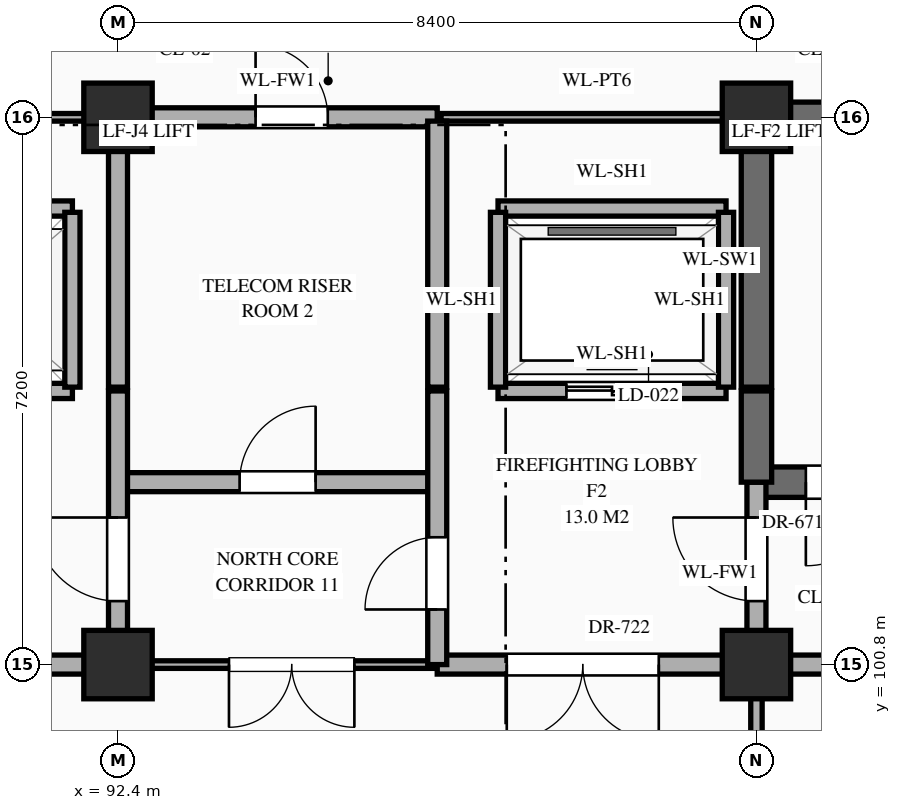
"""IFC4 building model, lengths in metres.
Left out: names, types, materials, properties, quantities, classifications, styles, units other than length and angle.
Written with IfcOpenShell. Run it as: python <this file> out.ifc"""

import sys

from ifc_helpers import new_model, si_unit, direction, frame, frame_2d, origin, origin_2d, place, context, subcontext, project, spatial, rectangle, extrude, element, fill, save


model = new_model("IFC4")
c1 = context("Model", 3, precision=1e-05, world=origin(), true_north=direction((0.0, 1.0)))
c2 = subcontext(c1, "Body", "Model", "MODEL_VIEW")
j1 = project(units=[si_unit("LENGTHUNIT", "METRE"), si_unit("PLANEANGLEUNIT", "RADIAN")], contexts=[c1])
p1 = place(None, origin())
s1 = spatial("IfcSite", under=j1, at=p1, CompositionType="ELEMENT")
p2 = place(p1, origin())
s2 = spatial("IfcBuilding", under=s1, at=p2, CompositionType="ELEMENT")
p3 = place(p2, origin())
s3 = spatial("IfcBuildingStorey", under=s2, at=p3, CompositionType="ELEMENT", Elevation=0.0)
for number, where, z_axis, x_axis in (
    (1, (92.4, 100.8, 0.0), (0.0, 0.0, 1.0), (1.0, 0.0, 0.0)),
    (2, (92.4, 108.0, 0.0), (0.0, 0.0, 1.0), (1.0, 0.0, 0.0)),
    (3, (100.8, 100.8, 0.0), (0.0, 0.0, 1.0), (1.0, 0.0, 0.0)),
    (4, (100.8, 108.0, 0.0), (0.0, 0.0, 1.0), (1.0, 0.0, 0.0)),
):
    element("IfcColumn", number, at=place(p3, frame(where, z_axis=z_axis, x_axis=x_axis)), inside=s3, PredefinedType="COLUMN", context=c2, shape_type="SweptSolid", body=[
        extrude(rectangle(XDim=0.9, YDim=0.9, at=origin_2d()), origin(), (0.0, 0.0, 1.0), 5.4),
    ])
p4 = place(p3, frame((75.6, 100.8, 0.0), z_axis=(0.0, 0.0, 1.0), x_axis=(1.0, 0.0, 0.0)))
e5 = element("IfcWall", 5, at=p4, inside=s3, PredefinedType="STANDARD", context=c2, shape_type="SweptSolid", body=[
    extrude(rectangle(XDim=16.8, YDim=0.25, at=frame_2d((8.4, 0.0))), origin(), (0.0, 0.0, 1.0), 4.27),
])
p5 = place(p4, frame((3.2, 0.0, 0.0)))
e6 = element("IfcOpeningElement", 6, at=p5, cuts=e5, PredefinedType="OPENING", context=c2, shape_type="SweptSolid", body=[
    extrude(rectangle(XDim=2.0, YDim=2.4, at=frame_2d((1.0, 1.2))), frame((0.0, 0.137, 0.0), z_axis=(0.0, -1.0, 0.0), x_axis=(1.0, 0.0, 0.0)), (0.0, 0.0, 1.0), 0.274),
])
p6 = place(p4, frame((11.7, 0.0, 0.0)))
e7 = element("IfcOpeningElement", 7, at=p6, cuts=e5, PredefinedType="OPENING", context=c2, shape_type="SweptSolid", body=[
    extrude(rectangle(XDim=1.8, YDim=2.35, at=frame_2d((0.9, 1.175))), frame((0.0, 0.137, 0.0), z_axis=(0.0, -1.0, 0.0), x_axis=(1.0, 0.0, 0.0)), (0.0, 0.0, 1.0), 0.274),
])
p7 = place(p3, frame((92.4, 100.8, 0.0), z_axis=(0.0, 0.0, 1.0), x_axis=(1.0, 0.0, 0.0)))
e8 = element("IfcWall", 8, at=p7, inside=s3, PredefinedType="STANDARD", context=c2, shape_type="SweptSolid", body=[
    extrude(rectangle(XDim=4.2, YDim=0.1, at=frame_2d((2.1, 0.0))), origin(), (0.0, 0.0, 1.0), 4.27),
])
p8 = place(p7, frame((1.46, 0.0, 0.0)))
e9 = element("IfcOpeningElement", 9, at=p8, cuts=e8, PredefinedType="OPENING", context=c2, shape_type="SweptSolid", body=[
    extrude(rectangle(XDim=1.65, YDim=2.4, at=frame_2d((0.825, 1.2))), frame((0.0, 0.062, 0.0), z_axis=(0.0, -1.0, 0.0), x_axis=(1.0, 0.0, 0.0)), (0.0, 0.0, 1.0), 0.124),
])
p9 = place(p3, frame((96.6, 100.8, 0.0), z_axis=(0.0, 0.0, 1.0), x_axis=(1.0, 0.0, 0.0)))
e10 = element("IfcWall", 10, at=p9, inside=s3, PredefinedType="STANDARD", context=c2, shape_type="SweptSolid", body=[
    extrude(rectangle(XDim=16.0, YDim=0.25, at=frame_2d((8.0, 0.0))), origin(), (0.0, 0.0, 1.0), 4.27),
])
p10 = place(p9, frame((7.925, 0.0, 0.0)))
e11 = element("IfcOpeningElement", 11, at=p10, cuts=e10, PredefinedType="OPENING", context=c2, shape_type="SweptSolid", body=[
    extrude(rectangle(XDim=0.95, YDim=2.15, at=frame_2d((0.475, 1.075))), frame((0.0, 0.137, 0.0), z_axis=(0.0, -1.0, 0.0), x_axis=(1.0, 0.0, 0.0)), (0.0, 0.0, 1.0), 0.274),
])
p11 = place(p9, frame((0.915, 0.0, 0.0)))
e12 = element("IfcOpeningElement", 12, at=p11, cuts=e10, PredefinedType="OPENING", context=c2, shape_type="SweptSolid", body=[
    extrude(rectangle(XDim=2.0, YDim=2.4, at=frame_2d((1.0, 1.2))), frame((0.0, 0.137, 0.0), z_axis=(0.0, -1.0, 0.0), x_axis=(1.0, 0.0, 0.0)), (0.0, 0.0, 1.0), 0.274),
])
p12 = place(p3, frame((92.4, 103.2, 0.0), z_axis=(0.0, 0.0, 1.0), x_axis=(1.0, 0.0, 0.0)))
e13 = element("IfcWall", 13, at=p12, inside=s3, PredefinedType="STANDARD", context=c2, shape_type="SweptSolid", body=[
    extrude(rectangle(XDim=4.2, YDim=0.25, at=frame_2d((2.1, 0.0))), origin(), (0.0, 0.0, 1.0), 5.12),
])
p13 = place(p12, frame((1.6, 0.0, 0.0)))
e14 = element("IfcOpeningElement", 14, at=p13, cuts=e13, PredefinedType="OPENING", context=c2, shape_type="SweptSolid", body=[
    extrude(rectangle(XDim=1.0, YDim=2.2, at=frame_2d((0.5, 1.1))), frame((0.0, 0.137, 0.0), z_axis=(0.0, -1.0, 0.0), x_axis=(1.0, 0.0, 0.0)), (0.0, 0.0, 1.0), 0.274),
])
p14 = place(p3, frame((100.8, 103.2, 0.0), z_axis=(0.0, 0.0, 1.0), x_axis=(1.0, 0.0, 0.0)))
e15 = element("IfcWall", 15, at=p14, inside=s3, PredefinedType="SHEAR", context=c2, shape_type="SweptSolid", body=[
    extrude(rectangle(XDim=8.4, YDim=0.4, at=frame_2d((4.2, 0.0))), origin(), (0.0, 0.0, 1.0), 5.12),
])
p15 = place(p14, frame((0.65, 0.0, 0.0)))
e16 = element("IfcOpeningElement", 16, at=p15, cuts=e15, PredefinedType="OPENING", context=c2, shape_type="SweptSolid", body=[
    extrude(rectangle(XDim=1.1, YDim=2.2, at=frame_2d((0.55, 1.1))), frame((0.0, 0.212, 0.0), z_axis=(0.0, -1.0, 0.0), x_axis=(1.0, 0.0, 0.0)), (0.0, 0.0, 1.0), 0.424),
])
p16 = place(p3, frame((89.4, 104.4, 0.0), z_axis=(0.0, 0.0, 1.0), x_axis=(1.0, 0.0, 0.0)))
e17 = element("IfcWall", 17, at=p16, inside=s3, PredefinedType="STANDARD", context=c2, shape_type="SweptSolid", body=[
    extrude(rectangle(XDim=2.4, YDim=0.2, at=frame_2d((1.2, 0.0))), origin(), (0.0, 0.0, 1.0), 5.12),
])
p17 = place(p16, frame((0.7, 0.0, 0.0)))
e18 = element("IfcOpeningElement", 18, at=p17, cuts=e17, PredefinedType="OPENING", context=c2, shape_type="SweptSolid", body=[
    extrude(rectangle(XDim=1.0, YDim=2.15, at=frame_2d((0.5, 1.075))), frame((0.0, 0.112, 0.0), z_axis=(0.0, -1.0, 0.0), x_axis=(1.0, 0.0, 0.0)), (0.0, 0.0, 1.0), 0.224),
])
p18 = place(p3, frame((97.4, 104.4, 0.0), z_axis=(0.0, 0.0, 1.0), x_axis=(1.0, 0.0, 0.0)))
e19 = element("IfcWall", 19, at=p18, inside=s3, PredefinedType="STANDARD", context=c2, shape_type="SweptSolid", body=[
    extrude(rectangle(XDim=3.0, YDim=0.2, at=frame_2d((1.5, 0.0))), origin(), (0.0, 0.0, 1.0), 5.12),
])
p19 = place(p18, frame((0.9, 0.0, 0.0)))
e20 = element("IfcOpeningElement", 20, at=p19, cuts=e19, PredefinedType="OPENING", context=c2, shape_type="SweptSolid", body=[
    extrude(rectangle(XDim=1.2, YDim=2.15, at=frame_2d((0.6, 1.075))), frame((0.0, 0.112, 0.0), z_axis=(0.0, -1.0, 0.0), x_axis=(1.0, 0.0, 0.0)), (0.0, 0.0, 1.0), 0.224),
])
p20 = place(p3, frame((89.4, 106.8, 0.0), z_axis=(0.0, 0.0, 1.0), x_axis=(1.0, 0.0, 0.0)))
e21 = element("IfcWall", 21, at=p20, inside=s3, PredefinedType="STANDARD", context=c2, shape_type="SweptSolid", body=[
    extrude(rectangle(XDim=2.4, YDim=0.2, at=frame_2d((1.2, 0.0))), origin(), (0.0, 0.0, 1.0), 5.12),
])
p21 = place(p3, frame((97.4, 106.8, 0.0), z_axis=(0.0, 0.0, 1.0), x_axis=(1.0, 0.0, 0.0)))
e22 = element("IfcWall", 22, at=p21, inside=s3, PredefinedType="STANDARD", context=c2, shape_type="SweptSolid", body=[
    extrude(rectangle(XDim=3.0, YDim=0.2, at=frame_2d((1.5, 0.0))), origin(), (0.0, 0.0, 1.0), 5.12),
])
p22 = place(p3, frame((86.2, 108.0, 0.0), z_axis=(0.0, 0.0, 1.0), x_axis=(1.0, 0.0, 0.0)))
e23 = element("IfcWall", 23, at=p22, inside=s3, PredefinedType="STANDARD", context=c2, shape_type="SweptSolid", body=[
    extrude(rectangle(XDim=6.15, YDim=0.1, at=frame_2d((3.075, 0.0))), origin(), (0.0, 0.0, 1.0), 4.27),
])
p23 = place(p3, frame((92.4, 108.0, 0.0), z_axis=(0.0, 0.0, 1.0), x_axis=(1.0, 0.0, 0.0)))
e24 = element("IfcWall", 24, at=p23, inside=s3, PredefinedType="STANDARD", context=c2, shape_type="SweptSolid", body=[
    extrude(rectangle(XDim=4.2, YDim=0.25, at=frame_2d((2.1, 0.0))), origin(), (0.0, 0.0, 1.0), 4.27),
])
p24 = place(p23, frame((1.81, 0.0, 0.0)))
e25 = element("IfcOpeningElement", 25, at=p24, cuts=e24, PredefinedType="OPENING", context=c2, shape_type="SweptSolid", body=[
    extrude(rectangle(XDim=0.95, YDim=2.15, at=frame_2d((0.475, 1.075))), frame((0.0, 0.137, 0.0), z_axis=(0.0, -1.0, 0.0), x_axis=(1.0, 0.0, 0.0)), (0.0, 0.0, 1.0), 0.274),
])
p25 = place(p3, frame((96.65, 108.0, 0.0), z_axis=(0.0, 0.0, 1.0), x_axis=(1.0, 0.0, 0.0)))
e26 = element("IfcWall", 26, at=p25, inside=s3, PredefinedType="STANDARD", context=c2, shape_type="SweptSolid", body=[
    extrude(rectangle(XDim=4.1, YDim=0.1, at=frame_2d((2.05, 0.0))), origin(), (0.0, 0.0, 1.0), 4.27),
])
p26 = place(p3, frame((100.8, 108.0, 0.0), z_axis=(0.0, 0.0, 1.0), x_axis=(1.0, 0.0, 0.0)))
e27 = element("IfcWall", 27, at=p26, inside=s3, PredefinedType="SHEAR", context=c2, shape_type="SweptSolid", body=[
    extrude(rectangle(XDim=8.4, YDim=0.4, at=frame_2d((4.2, 0.0))), origin(), (0.0, 0.0, 1.0), 5.12),
])
p27 = place(p3, frame((91.8, 104.45, 0.0), z_axis=(0.0, 0.0, 1.0), x_axis=(0.0, 1.0, 0.0)))
e28 = element("IfcWall", 28, at=p27, inside=s3, PredefinedType="STANDARD", context=c2, shape_type="SweptSolid", body=[
    extrude(rectangle(XDim=2.3, YDim=0.2, at=frame_2d((1.15, 0.0))), origin(), (0.0, 0.0, 1.0), 5.12),
])
p28 = place(p3, frame((92.4, 100.8, 0.0), z_axis=(0.0, 0.0, 1.0), x_axis=(0.0, 1.0, 0.0)))
e29 = element("IfcWall", 29, at=p28, inside=s3, PredefinedType="STANDARD", context=c2, shape_type="SweptSolid", body=[
    extrude(rectangle(XDim=3.6, YDim=0.25, at=frame_2d((1.8, 0.0))), origin(), (0.0, 0.0, 1.0), 4.37),
])
p29 = place(p28, frame((0.835, 0.0, 0.0)))
e30 = element("IfcOpeningElement", 30, at=p29, cuts=e29, PredefinedType="OPENING", context=c2, shape_type="SweptSolid", body=[
    extrude(rectangle(XDim=1.1, YDim=2.2, at=frame_2d((0.55, 1.1))), frame((0.0, 0.137, 0.0), z_axis=(0.0, -1.0, 0.0), x_axis=(1.0, 0.0, 0.0)), (0.0, 0.0, 1.0), 0.274),
])
p30 = place(p3, frame((92.4, 104.45, 0.0), z_axis=(0.0, 0.0, 1.0), x_axis=(0.0, 1.0, 0.0)))
e31 = element("IfcWall", 31, at=p30, inside=s3, PredefinedType="STANDARD", context=c2, shape_type="SweptSolid", body=[
    extrude(rectangle(XDim=3.5, YDim=0.25, at=frame_2d((1.75, 0.0))), origin(), (0.0, 0.0, 1.0), 4.37),
])
p31 = place(p3, frame((96.6, 100.8, 0.0), z_axis=(0.0, 0.0, 1.0), x_axis=(0.0, 1.0, 0.0)))
e32 = element("IfcWall", 32, at=p31, inside=s3, PredefinedType="STANDARD", context=c2, shape_type="SweptSolid", body=[
    extrude(rectangle(XDim=3.6, YDim=0.25, at=frame_2d((1.8, 0.0))), origin(), (0.0, 0.0, 1.0), 4.72),
])
p32 = place(p31, frame((0.725, 0.0, 0.0)))
e33 = element("IfcOpeningElement", 33, at=p32, cuts=e32, PredefinedType="OPENING", context=c2, shape_type="SweptSolid", body=[
    extrude(rectangle(XDim=0.95, YDim=2.15, at=frame_2d((0.475, 1.075))), frame((0.0, 0.137, 0.0), z_axis=(0.0, -1.0, 0.0), x_axis=(1.0, 0.0, 0.0)), (0.0, 0.0, 1.0), 0.274),
])
p33 = place(p3, frame((96.6, 104.45, 0.0), z_axis=(0.0, 0.0, 1.0), x_axis=(0.0, 1.0, 0.0)))
e34 = element("IfcWall", 34, at=p33, inside=s3, PredefinedType="STANDARD", context=c2, shape_type="SweptSolid", body=[
    extrude(rectangle(XDim=3.5, YDim=0.25, at=frame_2d((1.75, 0.0))), origin(), (0.0, 0.0, 1.0), 4.72),
])
for number, where, z_axis, x_axis in (
    (35, (97.4, 104.45, 0.0), (0.0, 0.0, 1.0), (0.0, 1.0, 0.0)),
    (36, (100.4, 104.45, 0.0), (0.0, 0.0, 1.0), (0.0, 1.0, 0.0)),
):
    element("IfcWall", number, at=place(p3, frame(where, z_axis=z_axis, x_axis=x_axis)), inside=s3, PredefinedType="STANDARD", context=c2, shape_type="SweptSolid", body=[
        extrude(rectangle(XDim=2.3, YDim=0.2, at=frame_2d((1.15, 0.0))), origin(), (0.0, 0.0, 1.0), 5.12),
    ])
p34 = place(p3, frame((100.8, 96.0, 0.0), z_axis=(0.0, 0.0, 1.0), x_axis=(0.0, 1.0, 0.0)))
e37 = element("IfcWall", 37, at=p34, inside=s3, PredefinedType="STANDARD", context=c2, shape_type="SweptSolid", body=[
    extrude(rectangle(XDim=4.8, YDim=0.15, at=frame_2d((2.4, 0.0))), origin(), (0.0, 0.0, 1.0), 4.37),
])
p35 = place(p34, frame((1.265, 0.0, 0.0)))
e38 = element("IfcOpeningElement", 38, at=p35, cuts=e37, PredefinedType="OPENING", context=c2, shape_type="SweptSolid", body=[
    extrude(rectangle(XDim=1.9, YDim=2.5, at=frame_2d((0.95, 1.25))), frame((0.0, 0.087, 0.0), z_axis=(0.0, -1.0, 0.0), x_axis=(1.0, 0.0, 0.0)), (0.0, 0.0, 1.0), 0.174),
])
p36 = place(p3, frame((100.8, 100.8, 0.0), z_axis=(0.0, 0.0, 1.0), x_axis=(0.0, 1.0, 0.0)))
e39 = element("IfcWall", 39, at=p36, inside=s3, PredefinedType="STANDARD", context=c2, shape_type="SweptSolid", body=[
    extrude(rectangle(XDim=2.4, YDim=0.25, at=frame_2d((1.2, 0.0))), origin(), (0.0, 0.0, 1.0), 4.37),
])
p37 = place(p36, frame((0.835, 0.0, 0.0)))
e40 = element("IfcOpeningElement", 40, at=p37, cuts=e39, PredefinedType="OPENING", context=c2, shape_type="SweptSolid", body=[
    extrude(rectangle(XDim=1.1, YDim=2.2, at=frame_2d((0.55, 1.1))), frame((0.0, 0.137, 0.0), z_axis=(0.0, -1.0, 0.0), x_axis=(1.0, 0.0, 0.0)), (0.0, 0.0, 1.0), 0.274),
])
p38 = place(p3, frame((100.8, 103.2, 0.0), z_axis=(0.0, 0.0, 1.0), x_axis=(0.0, 1.0, 0.0)))
e41 = element("IfcWall", 41, at=p38, inside=s3, PredefinedType="SHEAR", context=c2, shape_type="SweptSolid", body=[
    extrude(rectangle(XDim=1.2, YDim=0.4, at=frame_2d((0.6, 0.0))), origin(), (0.0, 0.0, 1.0), 5.12),
])
p39 = place(p3, frame((100.8, 104.45, 0.0), z_axis=(0.0, 0.0, 1.0), x_axis=(0.0, 1.0, 0.0)))
e42 = element("IfcWall", 42, at=p39, inside=s3, PredefinedType="SHEAR", context=c2, shape_type="SweptSolid", body=[
    extrude(rectangle(XDim=3.5, YDim=0.4, at=frame_2d((1.75, 0.0))), origin(), (0.0, 0.0, 1.0), 5.12),
])
p40 = place(p19, origin())
e43 = element("IfcDoor", 43, at=p40, inside=s3, OperationType="DOUBLE_DOOR_SLIDING", PredefinedType="DOOR", context=c2, shape_type="SweptSolid", body=[
    extrude(rectangle(XDim=1.2, YDim=2.15, at=frame_2d((0.6, 1.075))), frame((0.0, 0.025, 0.0), z_axis=(0.0, -1.0, 0.0), x_axis=(1.0, 0.0, 0.0)), (0.0, 0.0, 1.0), 0.05),
])
fill(e20, e43)
p41 = place(p15, frame((1.1, 0.0, 0.0), z_axis=(0.0, 0.0, 1.0), x_axis=(-1.0, 0.0, 0.0)))
e44 = element("IfcDoor", 44, at=p41, inside=s3, OperationType="SINGLE_SWING_RIGHT", PredefinedType="DOOR", context=c2, shape_type="SweptSolid", body=[
    extrude(rectangle(XDim=1.1, YDim=2.2, at=frame_2d((0.55, 1.1))), frame((0.0, 0.025, 0.0), z_axis=(0.0, -1.0, 0.0), x_axis=(1.0, 0.0, 0.0)), (0.0, 0.0, 1.0), 0.05),
])
fill(e16, e44)
p42 = place(p37, origin())
e45 = element("IfcDoor", 45, at=p42, inside=s3, OperationType="SINGLE_SWING_RIGHT", PredefinedType="DOOR", context=c2, shape_type="SweptSolid", body=[
    extrude(rectangle(XDim=1.1, YDim=2.2, at=frame_2d((0.55, 1.1))), frame((0.0, 0.025, 0.0), z_axis=(0.0, -1.0, 0.0), x_axis=(1.0, 0.0, 0.0)), (0.0, 0.0, 1.0), 0.05),
])
fill(e40, e45)
p43 = place(p13, origin())
e46 = element("IfcDoor", 46, at=p43, inside=s3, OperationType="SINGLE_SWING_RIGHT", PredefinedType="DOOR", context=c2, shape_type="SweptSolid", body=[
    extrude(rectangle(XDim=1.0, YDim=2.2, at=frame_2d((0.5, 1.1))), frame((0.0, 0.025, 0.0), z_axis=(0.0, -1.0, 0.0), x_axis=(1.0, 0.0, 0.0)), (0.0, 0.0, 1.0), 0.05),
])
fill(e14, e46)
p44 = place(p32, origin())
e47 = element("IfcDoor", 47, at=p44, inside=s3, OperationType="SINGLE_SWING_LEFT", PredefinedType="DOOR", context=c2, shape_type="SweptSolid", body=[
    extrude(rectangle(XDim=0.95, YDim=2.15, at=frame_2d((0.475, 1.075))), frame((0.0, 0.025, 0.0), z_axis=(0.0, -1.0, 0.0), x_axis=(1.0, 0.0, 0.0)), (0.0, 0.0, 1.0), 0.05),
])
fill(e33, e47)
p45 = place(p29, origin())
e48 = element("IfcDoor", 48, at=p45, inside=s3, OperationType="SINGLE_SWING_RIGHT", PredefinedType="DOOR", context=c2, shape_type="SweptSolid", body=[
    extrude(rectangle(XDim=1.1, YDim=2.2, at=frame_2d((0.55, 1.1))), frame((0.0, 0.025, 0.0), z_axis=(0.0, -1.0, 0.0), x_axis=(1.0, 0.0, 0.0)), (0.0, 0.0, 1.0), 0.05),
])
fill(e30, e48)
p46 = place(p8, frame((1.65, 0.0, 0.0), z_axis=(0.0, 0.0, 1.0), x_axis=(-1.0, 0.0, 0.0)))
e49 = element("IfcDoor", 49, at=p46, inside=s3, OperationType="DOUBLE_DOOR_SINGLE_SWING", PredefinedType="DOOR", context=c2, shape_type="SweptSolid", body=[
    extrude(rectangle(XDim=1.65, YDim=2.4, at=frame_2d((0.825, 1.2))), frame((0.0, 0.025, 0.0), z_axis=(0.0, -1.0, 0.0), x_axis=(1.0, 0.0, 0.0)), (0.0, 0.0, 1.0), 0.05),
])
fill(e9, e49)
p47 = place(p24, origin())
e50 = element("IfcDoor", 50, at=p47, inside=s3, OperationType="SINGLE_SWING_LEFT", PredefinedType="DOOR", context=c2, shape_type="SweptSolid", body=[
    extrude(rectangle(XDim=0.95, YDim=2.15, at=frame_2d((0.475, 1.075))), frame((0.0, 0.025, 0.0), z_axis=(0.0, -1.0, 0.0), x_axis=(1.0, 0.0, 0.0)), (0.0, 0.0, 1.0), 0.05),
])
fill(e25, e50)
p48 = place(p11, frame((2.0, 0.0, 0.0), z_axis=(0.0, 0.0, 1.0), x_axis=(-1.0, 0.0, 0.0)))
e51 = element("IfcDoor", 51, at=p48, inside=s3, OperationType="DOUBLE_DOOR_SINGLE_SWING", PredefinedType="DOOR", context=c2, shape_type="SweptSolid", body=[
    extrude(rectangle(XDim=2.0, YDim=2.4, at=frame_2d((1.0, 1.2))), frame((0.0, 0.025, 0.0), z_axis=(0.0, -1.0, 0.0), x_axis=(1.0, 0.0, 0.0)), (0.0, 0.0, 1.0), 0.05),
])
fill(e12, e51)
save(model, sys.argv[1])
